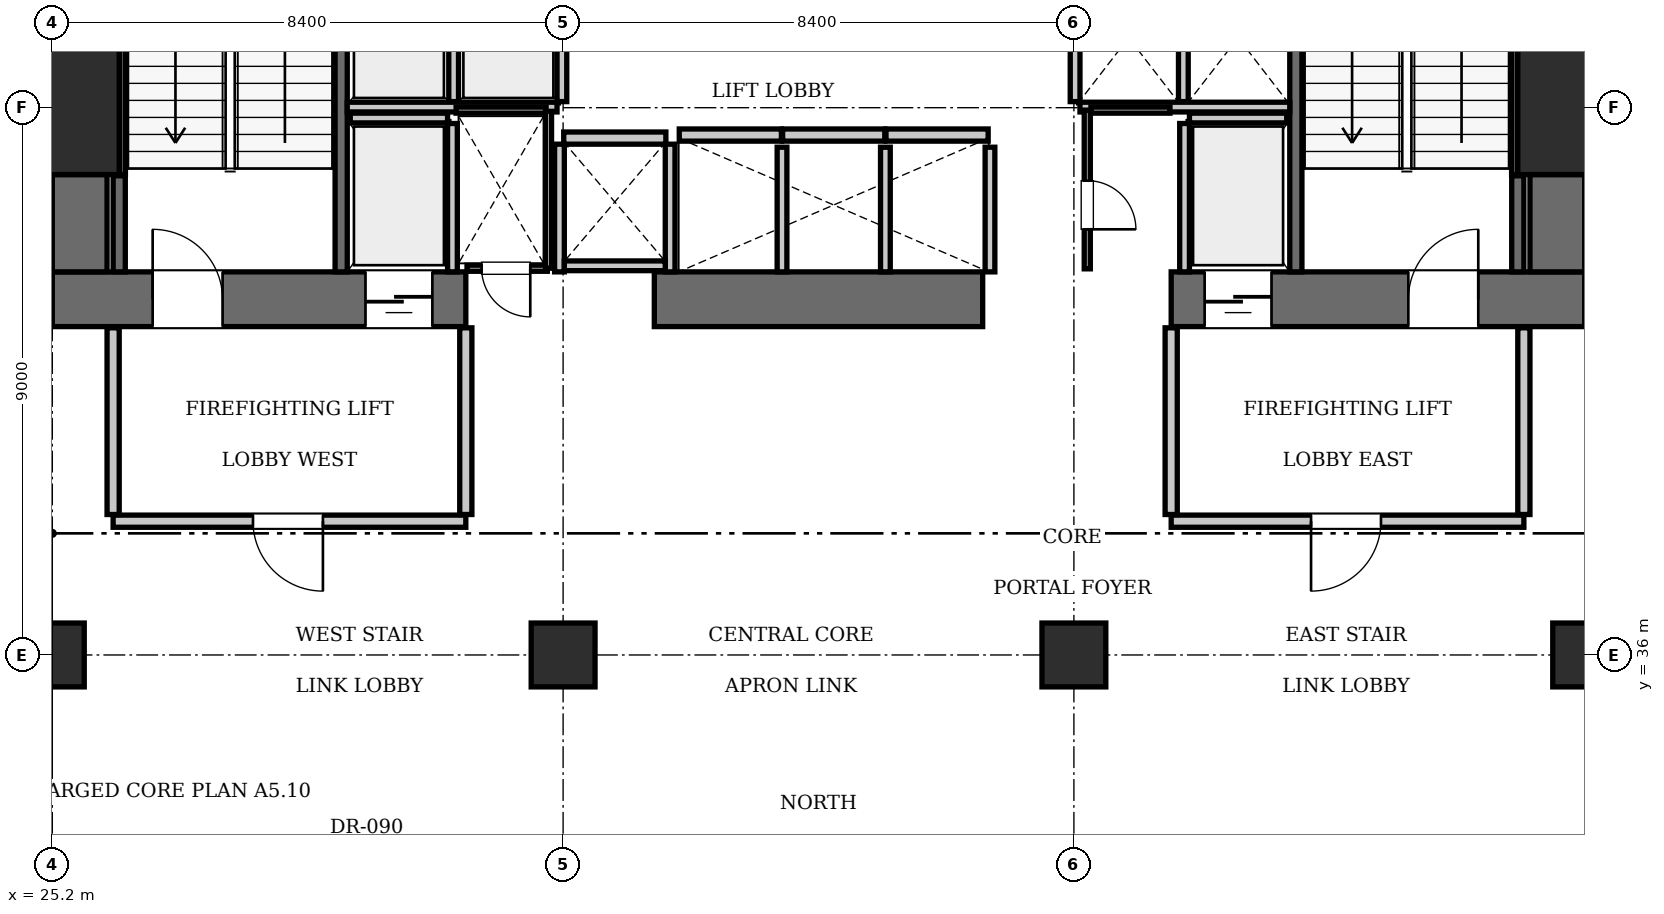
"""IFC4 building model, lengths in metres.
Left out: names, types, materials, properties, quantities, classifications, styles, units other than length and angle.
Written with IfcOpenShell. Run it as: python <this file> out.ifc"""

import sys

from ifc_helpers import new_model, si_unit, direction, frame, frame_2d, origin, origin_2d, place, context, subcontext, project, spatial, rectangle, extrude, element, fill, save


model = new_model("IFC4")
c1 = context("Model", 3, precision=1e-05, world=origin(), true_north=direction((0.0, 1.0)))
c2 = subcontext(c1, "Body", "Model", "MODEL_VIEW")
j1 = project(units=[si_unit("LENGTHUNIT", "METRE"), si_unit("PLANEANGLEUNIT", "RADIAN")], contexts=[c1])
p1 = place(None, origin())
s1 = spatial("IfcSite", under=j1, at=p1, CompositionType="ELEMENT")
p2 = place(p1, origin())
s2 = spatial("IfcBuilding", under=s1, at=p2, CompositionType="ELEMENT")
p3 = place(p2, frame((0.0, 0.0, 34.65)))
s3 = spatial("IfcBuildingStorey", under=s2, at=p3, CompositionType="ELEMENT", Elevation=34.65)
for number, where, z_axis, x_axis in (
    (1, (25.2, 45.0, 0.0), (0.0, 0.0, 1.0), (1.0, 0.0, 0.0)),
    (2, (50.4, 45.0, 0.0), (0.0, 0.0, 1.0), (1.0, 0.0, 0.0)),
):
    element("IfcColumn", number, at=place(p3, frame(where, z_axis=z_axis, x_axis=x_axis)), inside=s3, PredefinedType="COLUMN", context=c2, shape_type="SweptSolid", body=[
        extrude(rectangle(XDim=2.2, YDim=2.2, at=origin_2d()), origin(), (0.0, 0.0, 1.0), 3.85),
    ])
p4 = place(p3, frame((25.2, 41.85, 0.0), z_axis=(0.0, 0.0, 1.0), x_axis=(1.0, 0.0, 0.0)))
e3 = element("IfcWall", 3, at=p4, inside=s3, PredefinedType="SHEAR", context=c2, shape_type="SweptSolid", body=[
    extrude(rectangle(XDim=6.8, YDim=0.9, at=frame_2d((3.4, 0.0))), origin(), (0.0, 0.0, 1.0), 3.85),
])
p5 = place(p4, frame((1.65, 0.0, 0.0)))
e4 = element("IfcOpeningElement", 4, at=p5, cuts=e3, PredefinedType="OPENING", context=c2, shape_type="SweptSolid", body=[
    extrude(rectangle(XDim=1.15, YDim=2.15, at=frame_2d((0.575, 1.075))), frame((0.0, 0.46, 0.0), z_axis=(0.0, -1.0, 0.0), x_axis=(1.0, 0.0, 0.0)), (0.0, 0.0, 1.0), 0.92),
])
p6 = place(p4, frame((5.15, 0.0, 0.0)))
e5 = element("IfcOpeningElement", 5, at=p6, cuts=e3, PredefinedType="OPENING", context=c2, shape_type="SweptSolid", body=[
    extrude(rectangle(XDim=1.1, YDim=2.2, at=frame_2d((0.55, 1.1))), frame((0.0, 0.46, 0.0), z_axis=(0.0, -1.0, 0.0), x_axis=(1.0, 0.0, 0.0)), (0.0, 0.0, 1.0), 0.92),
])
p7 = place(p3, frame((35.1, 41.85, 0.0), z_axis=(0.0, 0.0, 1.0), x_axis=(1.0, 0.0, 0.0)))
e6 = element("IfcWall", 6, at=p7, inside=s3, PredefinedType="SHEAR", context=c2, shape_type="SweptSolid", body=[
    extrude(rectangle(XDim=5.4, YDim=0.9, at=frame_2d((2.7, 0.0))), origin(), (0.0, 0.0, 1.0), 3.85),
])
p8 = place(p3, frame((43.6, 41.85, 0.0), z_axis=(0.0, 0.0, 1.0), x_axis=(1.0, 0.0, 0.0)))
e7 = element("IfcWall", 7, at=p8, inside=s3, PredefinedType="SHEAR", context=c2, shape_type="SweptSolid", body=[
    extrude(rectangle(XDim=6.8, YDim=0.9, at=frame_2d((3.4, 0.0))), origin(), (0.0, 0.0, 1.0), 3.85),
])
p9 = place(p8, frame((3.9, 0.0, 0.0)))
e8 = element("IfcOpeningElement", 8, at=p9, cuts=e7, PredefinedType="OPENING", context=c2, shape_type="SweptSolid", body=[
    extrude(rectangle(XDim=1.15, YDim=2.15, at=frame_2d((0.575, 1.075))), frame((0.0, 0.46, 0.0), z_axis=(0.0, -1.0, 0.0), x_axis=(1.0, 0.0, 0.0)), (0.0, 0.0, 1.0), 0.92),
])
p10 = place(p8, frame((0.55, 0.0, 0.0)))
e9 = element("IfcOpeningElement", 9, at=p10, cuts=e7, PredefinedType="OPENING", context=c2, shape_type="SweptSolid", body=[
    extrude(rectangle(XDim=1.1, YDim=2.2, at=frame_2d((0.55, 1.1))), frame((0.0, 0.46, 0.0), z_axis=(0.0, -1.0, 0.0), x_axis=(1.0, 0.0, 0.0)), (0.0, 0.0, 1.0), 0.92),
])
for number, where, z_axis, x_axis in (
    (10, (25.65, 42.3, 0.0), (0.0, 0.0, 1.0), (0.0, 1.0, 0.0)),
    (11, (49.95, 42.3, 0.0), (0.0, 0.0, 1.0), (0.0, 1.0, 0.0)),
):
    element("IfcWall", number, at=place(p3, frame(where, z_axis=z_axis, x_axis=x_axis)), inside=s3, PredefinedType="SHEAR", context=c2, shape_type="SweptSolid", body=[
        extrude(rectangle(XDim=1.6, YDim=0.9, at=frame_2d((0.8, 0.0))), origin(), (0.0, 0.0, 1.0), 3.85),
    ])
for number, where, z_axis, x_axis in (
    (12, (25.2, 36.0, 0.0), (0.0, 0.0, 1.0), (1.0, 0.0, 0.0)),
    (13, (33.6, 36.0, 0.0), (0.0, 0.0, 1.0), (1.0, 0.0, 0.0)),
    (14, (42.0, 36.0, 0.0), (0.0, 0.0, 1.0), (1.0, 0.0, 0.0)),
    (15, (50.4, 36.0, 0.0), (0.0, 0.0, 1.0), (1.0, 0.0, 0.0)),
):
    element("IfcColumn", number, at=place(p3, frame(where, z_axis=z_axis, x_axis=x_axis)), inside=s3, PredefinedType="COLUMN", context=c2, shape_type="SweptSolid", body=[
        extrude(rectangle(XDim=1.05, YDim=1.05, at=origin_2d()), origin(), (0.0, 0.0, 1.0), 3.85),
    ])
p11 = place(p3, frame((29.95, 42.3, 0.0), z_axis=(0.0, 0.0, 1.0), x_axis=(0.0, 1.0, 0.0)))
e16 = element("IfcWall", 16, at=p11, inside=s3, PredefinedType="SOLIDWALL", context=c2, shape_type="SweptSolid", body=[
    extrude(rectangle(XDim=8.85, YDim=0.2, at=frame_2d((4.425, 0.0))), origin(), (0.0, 0.0, 1.0), 3.61),
])
p12 = place(p3, frame((26.3, 42.3, 0.0), z_axis=(0.0, 0.0, 1.0), x_axis=(0.0, 1.0, 0.0)))
e17 = element("IfcWall", 17, at=p12, inside=s3, PredefinedType="SOLIDWALL", context=c2, shape_type="SweptSolid", body=[
    extrude(rectangle(XDim=1.58, YDim=0.2, at=frame_2d((0.79, 0.0))), origin(), (0.0, 0.0, 1.0), 3.61),
])
p13 = place(p3, frame((26.352, 43.9, 0.0), z_axis=(0.0, 0.0, 1.0), x_axis=(0.0, 1.0, 0.0)))
e18 = element("IfcWall", 18, at=p13, inside=s3, PredefinedType="SOLIDWALL", context=c2, shape_type="SweptSolid", body=[
    extrude(rectangle(XDim=2.2, YDim=0.1, at=frame_2d((1.1, 0.0))), origin(), (0.0, 0.0, 1.0), 3.61),
])
p14 = place(p3, frame((45.65, 42.3, 0.0), z_axis=(0.0, 0.0, 1.0), x_axis=(0.0, 1.0, 0.0)))
e19 = element("IfcWall", 19, at=p14, inside=s3, PredefinedType="SOLIDWALL", context=c2, shape_type="SweptSolid", body=[
    extrude(rectangle(XDim=8.85, YDim=0.2, at=frame_2d((4.425, 0.0))), origin(), (0.0, 0.0, 1.0), 3.61),
])
p15 = place(p3, frame((49.3, 42.3, 0.0), z_axis=(0.0, 0.0, 1.0), x_axis=(0.0, 1.0, 0.0)))
e20 = element("IfcWall", 20, at=p15, inside=s3, PredefinedType="SOLIDWALL", context=c2, shape_type="SweptSolid", body=[
    extrude(rectangle(XDim=1.58, YDim=0.2, at=frame_2d((0.79, 0.0))), origin(), (0.0, 0.0, 1.0), 3.61),
])
p16 = place(p3, frame((49.248, 43.9, 0.0), z_axis=(0.0, 0.0, 1.0), x_axis=(0.0, 1.0, 0.0)))
e21 = element("IfcWall", 21, at=p16, inside=s3, PredefinedType="SOLIDWALL", context=c2, shape_type="SweptSolid", body=[
    extrude(rectangle(XDim=2.2, YDim=0.1, at=frame_2d((1.1, 0.0))), origin(), (0.0, 0.0, 1.0), 3.61),
])
for number, where, z_axis, x_axis in (
    (22, (35.51, 44.55, 0.0), (0.0, 0.0, 1.0), (1.0, 0.0, 0.0)),
    (23, (37.21, 44.55, 0.0), (0.0, 0.0, 1.0), (1.0, 0.0, 0.0)),
):
    element("IfcWall", number, at=place(p3, frame(where, z_axis=z_axis, x_axis=x_axis)), inside=s3, PredefinedType="SOLIDWALL", context=c2, shape_type="SweptSolid", body=[
        extrude(rectangle(XDim=1.68, YDim=0.2, at=frame_2d((0.84, 0.0))), origin(), (0.0, 0.0, 1.0), 3.61),
    ])
p17 = place(p3, frame((38.91, 44.55, 0.0), z_axis=(0.0, 0.0, 1.0), x_axis=(1.0, 0.0, 0.0)))
e24 = element("IfcWall", 24, at=p17, inside=s3, PredefinedType="SOLIDWALL", context=c2, shape_type="SweptSolid", body=[
    extrude(rectangle(XDim=1.68, YDim=0.2, at=frame_2d((0.84, 0.0))), origin(), (0.0, 0.0, 1.0), 3.61),
])
p18 = place(p3, frame((33.61, 44.5, 0.0), z_axis=(0.0, 0.0, 1.0), x_axis=(1.0, 0.0, 0.0)))
e25 = element("IfcWall", 25, at=p18, inside=s3, PredefinedType="SOLIDWALL", context=c2, shape_type="SweptSolid", body=[
    extrude(rectangle(XDim=1.68, YDim=0.2, at=frame_2d((0.84, 0.0))), origin(), (0.0, 0.0, 1.0), 3.61),
])
p19 = place(p3, frame((30.1, 44.83, 0.0), z_axis=(0.0, 0.0, 1.0), x_axis=(1.0, 0.0, 0.0)))
e26 = element("IfcWall", 26, at=p19, inside=s3, PredefinedType="SOLIDWALL", context=c2, shape_type="SweptSolid", body=[
    extrude(rectangle(XDim=1.6, YDim=0.16, at=frame_2d((0.8, 0.0))), origin(), (0.0, 0.0, 1.0), 3.61),
])
p20 = place(p3, frame((31.78, 42.3, 0.0), z_axis=(0.0, 0.0, 1.0), x_axis=(0.0, 1.0, 0.0)))
e27 = element("IfcWall", 27, at=p20, inside=s3, PredefinedType="SOLIDWALL", context=c2, shape_type="SweptSolid", body=[
    extrude(rectangle(XDim=2.44, YDim=0.16, at=frame_2d((1.22, 0.0))), origin(), (0.0, 0.0, 1.0), 3.61),
])
p21 = place(p3, frame((43.9, 44.83, 0.0), z_axis=(0.0, 0.0, 1.0), x_axis=(1.0, 0.0, 0.0)))
e28 = element("IfcWall", 28, at=p21, inside=s3, PredefinedType="SOLIDWALL", context=c2, shape_type="SweptSolid", body=[
    extrude(rectangle(XDim=1.6, YDim=0.16, at=frame_2d((0.8, 0.0))), origin(), (0.0, 0.0, 1.0), 3.61),
])
p22 = place(p3, frame((43.82, 42.3, 0.0), z_axis=(0.0, 0.0, 1.0), x_axis=(0.0, 1.0, 0.0)))
e29 = element("IfcWall", 29, at=p22, inside=s3, PredefinedType="SOLIDWALL", context=c2, shape_type="SweptSolid", body=[
    extrude(rectangle(XDim=2.44, YDim=0.16, at=frame_2d((1.22, 0.0))), origin(), (0.0, 0.0, 1.0), 3.61),
])
for number, where, z_axis, x_axis in (
    (30, (31.8, 45.1, 0.0), (0.0, 0.0, 1.0), (0.0, 1.0, 0.0)),
    (31, (33.58, 45.1, 0.0), (0.0, 0.0, 1.0), (0.0, 1.0, 0.0)),
):
    element("IfcWall", number, at=place(p3, frame(where, z_axis=z_axis, x_axis=x_axis)), inside=s3, PredefinedType="SOLIDWALL", context=c2, shape_type="SweptSolid", body=[
        extrude(rectangle(XDim=1.95, YDim=0.16, at=frame_2d((0.975, 0.0))), origin(), (0.0, 0.0, 1.0), 3.61),
    ])
p23 = place(p3, frame((30.05, 45.01, 0.0), z_axis=(0.0, 0.0, 1.0), x_axis=(1.0, 0.0, 0.0)))
e32 = element("IfcWall", 32, at=p23, inside=s3, PredefinedType="SOLIDWALL", context=c2, shape_type="SweptSolid", body=[
    extrude(rectangle(XDim=3.45, YDim=0.16, at=frame_2d((1.725, 0.0))), origin(), (0.0, 0.0, 1.0), 3.61),
])
for number, where, z_axis, x_axis in (
    (33, (42.02, 45.1, 0.0), (0.0, 0.0, 1.0), (0.0, 1.0, 0.0)),
    (34, (43.8, 45.1, 0.0), (0.0, 0.0, 1.0), (0.0, 1.0, 0.0)),
):
    element("IfcWall", number, at=place(p3, frame(where, z_axis=z_axis, x_axis=x_axis)), inside=s3, PredefinedType="SOLIDWALL", context=c2, shape_type="SweptSolid", body=[
        extrude(rectangle(XDim=1.95, YDim=0.16, at=frame_2d((0.975, 0.0))), origin(), (0.0, 0.0, 1.0), 3.61),
    ])
p24 = place(p3, frame((42.1, 45.01, 0.0), z_axis=(0.0, 0.0, 1.0), x_axis=(1.0, 0.0, 0.0)))
e35 = element("IfcWall", 35, at=p24, inside=s3, PredefinedType="SOLIDWALL", context=c2, shape_type="SweptSolid", body=[
    extrude(rectangle(XDim=3.45, YDim=0.16, at=frame_2d((1.725, 0.0))), origin(), (0.0, 0.0, 1.0), 3.61),
])
for number, where, z_axis, x_axis in (
    (36, (37.2, 42.3, 0.0), (0.0, 0.0, 1.0), (0.0, 1.0, 0.0)),
    (37, (38.9, 42.3, 0.0), (0.0, 0.0, 1.0), (0.0, 1.0, 0.0)),
    (38, (40.62, 42.3, 0.0), (0.0, 0.0, 1.0), (0.0, 1.0, 0.0)),
):
    element("IfcWall", number, at=place(p3, frame(where, z_axis=z_axis, x_axis=x_axis)), inside=s3, PredefinedType="SOLIDWALL", context=c2, shape_type="SweptSolid", body=[
        extrude(rectangle(XDim=2.05, YDim=0.16, at=frame_2d((1.025, 0.0))), origin(), (0.0, 0.0, 1.0), 3.61),
    ])
for number, where, z_axis, x_axis in (
    (39, (33.54, 42.3, 0.0), (0.0, 0.0, 1.0), (0.0, 1.0, 0.0)),
    (40, (35.36, 42.3, 0.0), (0.0, 0.0, 1.0), (0.0, 1.0, 0.0)),
):
    element("IfcWall", number, at=place(p3, frame(where, z_axis=z_axis, x_axis=x_axis)), inside=s3, PredefinedType="SOLIDWALL", context=c2, shape_type="SweptSolid", body=[
        extrude(rectangle(XDim=2.1, YDim=0.16, at=frame_2d((1.05, 0.0))), origin(), (0.0, 0.0, 1.0), 3.61),
    ])
p25 = place(p3, frame((33.62, 42.4, 0.0), z_axis=(0.0, 0.0, 1.0), x_axis=(1.0, 0.0, 0.0)))
e41 = element("IfcWall", 41, at=p25, inside=s3, PredefinedType="SOLIDWALL", context=c2, shape_type="SweptSolid", body=[
    extrude(rectangle(XDim=1.66, YDim=0.16, at=frame_2d((0.83, 0.0))), origin(), (0.0, 0.0, 1.0), 3.61),
])
p26 = place(p3, frame((26.2, 38.2, 0.0), z_axis=(0.0, 0.0, 1.0), x_axis=(1.0, 0.0, 0.0)))
e42 = element("IfcWall", 42, at=p26, inside=s3, PredefinedType="PARTITIONING", context=c2, shape_type="SweptSolid", body=[
    extrude(rectangle(XDim=5.8, YDim=0.2, at=frame_2d((2.9, 0.0))), origin(), (0.0, 0.0, 1.0), 3.61),
])
p27 = place(p26, frame((2.3, 0.0, 0.0)))
e43 = element("IfcOpeningElement", 43, at=p27, cuts=e42, PredefinedType="OPENING", context=c2, shape_type="SweptSolid", body=[
    extrude(rectangle(XDim=1.15, YDim=2.15, at=frame_2d((0.575, 1.075))), frame((0.0, 0.11, 0.0), z_axis=(0.0, -1.0, 0.0), x_axis=(1.0, 0.0, 0.0)), (0.0, 0.0, 1.0), 0.22),
])
for number, where, z_axis, x_axis in (
    (44, (26.2, 38.31, 0.0), (0.0, 0.0, 1.0), (0.0, 1.0, 0.0)),
    (45, (32.0, 38.31, 0.0), (0.0, 0.0, 1.0), (0.0, 1.0, 0.0)),
):
    element("IfcWall", number, at=place(p3, frame(where, z_axis=z_axis, x_axis=x_axis)), inside=s3, PredefinedType="PARTITIONING", context=c2, shape_type="SweptSolid", body=[
        extrude(rectangle(XDim=3.07, YDim=0.2, at=frame_2d((1.535, 0.0))), origin(), (0.0, 0.0, 1.0), 3.61),
    ])
p28 = place(p3, frame((43.6, 38.2, 0.0), z_axis=(0.0, 0.0, 1.0), x_axis=(1.0, 0.0, 0.0)))
e46 = element("IfcWall", 46, at=p28, inside=s3, PredefinedType="PARTITIONING", context=c2, shape_type="SweptSolid", body=[
    extrude(rectangle(XDim=5.8, YDim=0.2, at=frame_2d((2.9, 0.0))), origin(), (0.0, 0.0, 1.0), 3.61),
])
p29 = place(p28, frame((2.3, 0.0, 0.0)))
e47 = element("IfcOpeningElement", 47, at=p29, cuts=e46, PredefinedType="OPENING", context=c2, shape_type="SweptSolid", body=[
    extrude(rectangle(XDim=1.15, YDim=2.15, at=frame_2d((0.575, 1.075))), frame((0.0, 0.11, 0.0), z_axis=(0.0, -1.0, 0.0), x_axis=(1.0, 0.0, 0.0)), (0.0, 0.0, 1.0), 0.22),
])
for number, where, z_axis, x_axis in (
    (48, (43.6, 38.31, 0.0), (0.0, 0.0, 1.0), (0.0, 1.0, 0.0)),
    (49, (49.4, 38.31, 0.0), (0.0, 0.0, 1.0), (0.0, 1.0, 0.0)),
):
    element("IfcWall", number, at=place(p3, frame(where, z_axis=z_axis, x_axis=x_axis)), inside=s3, PredefinedType="PARTITIONING", context=c2, shape_type="SweptSolid", body=[
        extrude(rectangle(XDim=3.07, YDim=0.2, at=frame_2d((1.535, 0.0))), origin(), (0.0, 0.0, 1.0), 3.61),
    ])
p30 = place(p3, frame((32.02, 42.36, 0.0), z_axis=(0.0, 0.0, 1.0), x_axis=(1.0, 0.0, 0.0)))
e50 = element("IfcWall", 50, at=p30, inside=s3, PredefinedType="PARTITIONING", context=c2, shape_type="SweptSolid", body=[
    extrude(rectangle(XDim=1.32, YDim=0.1, at=frame_2d((0.66, 0.0))), origin(), (0.0, 0.0, 1.0), 3.61),
])
p31 = place(p30, frame((0.24, 0.0, 0.0)))
e51 = element("IfcOpeningElement", 51, at=p31, cuts=e50, PredefinedType="OPENING", context=c2, shape_type="SweptSolid", body=[
    extrude(rectangle(XDim=0.8, YDim=2.05, at=frame_2d((0.4, 1.025))), frame((0.0, 0.06, 0.0), z_axis=(0.0, -1.0, 0.0), x_axis=(1.0, 0.0, 0.0)), (0.0, 0.0, 1.0), 0.12),
])
p32 = place(p3, frame((31.84, 44.96, 0.0), z_axis=(0.0, 0.0, 1.0), x_axis=(1.0, 0.0, 0.0)))
e52 = element("IfcWall", 52, at=p32, inside=s3, PredefinedType="PARTITIONING", context=c2, shape_type="SweptSolid", body=[
    extrude(rectangle(XDim=1.48, YDim=0.1, at=frame_2d((0.74, 0.0))), origin(), (0.0, 0.0, 1.0), 3.61),
])
p33 = place(p3, frame((33.36, 42.36, 0.0), z_axis=(0.0, 0.0, 1.0), x_axis=(0.0, 1.0, 0.0)))
e53 = element("IfcWall", 53, at=p33, inside=s3, PredefinedType="PARTITIONING", context=c2, shape_type="SweptSolid", body=[
    extrude(rectangle(XDim=2.58, YDim=0.1, at=frame_2d((1.29, 0.0))), origin(), (0.0, 0.0, 1.0), 3.61),
])
p34 = place(p3, frame((42.22, 42.35, 0.0), z_axis=(0.0, 0.0, 1.0), x_axis=(0.0, 1.0, 0.0)))
e54 = element("IfcWall", 54, at=p34, inside=s3, PredefinedType="PARTITIONING", context=c2, shape_type="SweptSolid", body=[
    extrude(rectangle(XDim=2.61, YDim=0.1, at=frame_2d((1.305, 0.0))), origin(), (0.0, 0.0, 1.0), 3.61),
])
p35 = place(p34, frame((0.65, 0.0, 0.0)))
e55 = element("IfcOpeningElement", 55, at=p35, cuts=e54, PredefinedType="OPENING", context=c2, shape_type="SweptSolid", body=[
    extrude(rectangle(XDim=0.8, YDim=2.05, at=frame_2d((0.4, 1.025))), frame((0.0, 0.06, 0.0), z_axis=(0.0, -1.0, 0.0), x_axis=(1.0, 0.0, 0.0)), (0.0, 0.0, 1.0), 0.12),
])
p36 = place(p3, frame((42.28, 44.96, 0.0), z_axis=(0.0, 0.0, 1.0), x_axis=(1.0, 0.0, 0.0)))
e56 = element("IfcWall", 56, at=p36, inside=s3, PredefinedType="PARTITIONING", context=c2, shape_type="SweptSolid", body=[
    extrude(rectangle(XDim=1.3, YDim=0.1, at=frame_2d((0.65, 0.0))), origin(), (0.0, 0.0, 1.0), 3.61),
])
p37 = place(p5, origin())
e57 = element("IfcDoor", 57, at=p37, inside=s3, OperationType="SINGLE_SWING_LEFT", PredefinedType="DOOR", context=c2, shape_type="SweptSolid", body=[
    extrude(rectangle(XDim=1.15, YDim=2.15, at=frame_2d((0.575, 1.075))), frame((0.0, 0.025, 0.0), z_axis=(0.0, -1.0, 0.0), x_axis=(1.0, 0.0, 0.0)), (0.0, 0.0, 1.0), 0.05),
])
fill(e4, e57)
p38 = place(p9, origin())
e58 = element("IfcDoor", 58, at=p38, inside=s3, OperationType="SINGLE_SWING_RIGHT", PredefinedType="DOOR", context=c2, shape_type="SweptSolid", body=[
    extrude(rectangle(XDim=1.15, YDim=2.15, at=frame_2d((0.575, 1.075))), frame((0.0, 0.025, 0.0), z_axis=(0.0, -1.0, 0.0), x_axis=(1.0, 0.0, 0.0)), (0.0, 0.0, 1.0), 0.05),
])
fill(e8, e58)
p39 = place(p6, frame((1.1, 0.0, 0.0), z_axis=(0.0, 0.0, 1.0), x_axis=(-1.0, 0.0, 0.0)))
e59 = element("IfcDoor", 59, at=p39, inside=s3, OperationType="SLIDING_TO_LEFT", PredefinedType="DOOR", context=c2, shape_type="SweptSolid", body=[
    extrude(rectangle(XDim=1.1, YDim=2.2, at=frame_2d((0.55, 1.1))), frame((0.0, 0.025, 0.0), z_axis=(0.0, -1.0, 0.0), x_axis=(1.0, 0.0, 0.0)), (0.0, 0.0, 1.0), 0.05),
])
fill(e5, e59)
p40 = place(p10, frame((1.1, 0.0, 0.0), z_axis=(0.0, 0.0, 1.0), x_axis=(-1.0, 0.0, 0.0)))
e60 = element("IfcDoor", 60, at=p40, inside=s3, OperationType="SLIDING_TO_LEFT", PredefinedType="DOOR", context=c2, shape_type="SweptSolid", body=[
    extrude(rectangle(XDim=1.1, YDim=2.2, at=frame_2d((0.55, 1.1))), frame((0.0, 0.025, 0.0), z_axis=(0.0, -1.0, 0.0), x_axis=(1.0, 0.0, 0.0)), (0.0, 0.0, 1.0), 0.05),
])
fill(e9, e60)
p41 = place(p27, frame((1.15, 0.0, 0.0), z_axis=(0.0, 0.0, 1.0), x_axis=(-1.0, 0.0, 0.0)))
e61 = element("IfcDoor", 61, at=p41, inside=s3, OperationType="SINGLE_SWING_LEFT", PredefinedType="DOOR", context=c2, shape_type="SweptSolid", body=[
    extrude(rectangle(XDim=1.15, YDim=2.15, at=frame_2d((0.575, 1.075))), frame((0.0, 0.025, 0.0), z_axis=(0.0, -1.0, 0.0), x_axis=(1.0, 0.0, 0.0)), (0.0, 0.0, 1.0), 0.05),
])
fill(e43, e61)
p42 = place(p29, frame((1.15, 0.0, 0.0), z_axis=(0.0, 0.0, 1.0), x_axis=(-1.0, 0.0, 0.0)))
e62 = element("IfcDoor", 62, at=p42, inside=s3, OperationType="SINGLE_SWING_RIGHT", PredefinedType="DOOR", context=c2, shape_type="SweptSolid", body=[
    extrude(rectangle(XDim=1.15, YDim=2.15, at=frame_2d((0.575, 1.075))), frame((0.0, 0.025, 0.0), z_axis=(0.0, -1.0, 0.0), x_axis=(1.0, 0.0, 0.0)), (0.0, 0.0, 1.0), 0.05),
])
fill(e47, e62)
p43 = place(p31, frame((0.8, 0.0, 0.0), z_axis=(0.0, 0.0, 1.0), x_axis=(-1.0, 0.0, 0.0)))
e63 = element("IfcDoor", 63, at=p43, inside=s3, OperationType="SINGLE_SWING_LEFT", PredefinedType="DOOR", context=c2, shape_type="SweptSolid", body=[
    extrude(rectangle(XDim=0.8, YDim=2.05, at=frame_2d((0.4, 1.025))), frame((0.0, 0.025, 0.0), z_axis=(0.0, -1.0, 0.0), x_axis=(1.0, 0.0, 0.0)), (0.0, 0.0, 1.0), 0.05),
])
fill(e51, e63)
p44 = place(p35, frame((0.8, 0.0, 0.0), z_axis=(0.0, 0.0, 1.0), x_axis=(-1.0, 0.0, 0.0)))
e64 = element("IfcDoor", 64, at=p44, inside=s3, OperationType="SINGLE_SWING_RIGHT", PredefinedType="DOOR", context=c2, shape_type="SweptSolid", body=[
    extrude(rectangle(XDim=0.8, YDim=2.05, at=frame_2d((0.4, 1.025))), frame((0.0, 0.025, 0.0), z_axis=(0.0, -1.0, 0.0), x_axis=(1.0, 0.0, 0.0)), (0.0, 0.0, 1.0), 0.05),
])
fill(e55, e64)
save(model, sys.argv[1])
